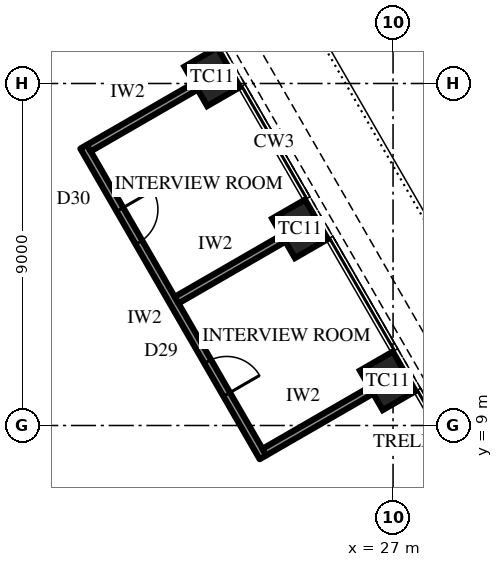
"""IFC4 building model, lengths in metres.
Left out: names, types, materials, properties, quantities, classifications, styles, units other than length and angle.
Written with IfcOpenShell. Run it as: python <this file> out.ifc"""

import sys

from ifc_helpers import new_model, si_unit, direction, frame, frame_2d, origin, origin_2d, place, context, subcontext, project, spatial, rectangle, extrude, element, fill, save


model = new_model("IFC4")
c1 = context("Model", 3, precision=1e-05, world=origin(), true_north=direction((0.0, 1.0)))
c2 = subcontext(c1, "Body", "Model", "MODEL_VIEW")
j1 = project(units=[si_unit("LENGTHUNIT", "METRE"), si_unit("PLANEANGLEUNIT", "RADIAN")], contexts=[c1])
p1 = place(None, origin())
s1 = spatial("IfcSite", under=j1, at=p1, CompositionType="ELEMENT")
p2 = place(p1, origin())
s2 = spatial("IfcBuilding", under=s1, at=p2, CompositionType="ELEMENT")
p3 = place(p2, frame((0.0, 0.0, 270.1)))
s3 = spatial("IfcBuildingStorey", under=s2, at=p3, CompositionType="ELEMENT", Elevation=270.1)
for number, where, z_axis, x_axis in (
    (1, (26.861, 10.175, 0.0), (0.0, 0.0, 1.0), (-0.5, 0.866, 0.0)),
    (2, (24.552, 14.175, 0.0), (0.0, 0.0, 1.0), (-0.5, 0.866, 0.0)),
    (3, (22.242, 18.175, 0.0), (0.0, 0.0, 1.0), (-0.5, 0.866, 0.0)),
):
    element("IfcColumn", number, at=place(p3, frame(where, z_axis=z_axis, x_axis=x_axis)), inside=s3, PredefinedType="COLUMN", context=c2, shape_type="SweptSolid", body=[
        extrude(rectangle(XDim=1.2, YDim=1.0, at=origin_2d()), origin(), (0.0, 0.0, 1.0), 4.2),
    ])
p4 = place(p3, frame((23.577, 8.163, 0.0), z_axis=(0.0, 0.0, 1.0), x_axis=(-0.499989672313, 0.866031366395, 0.0)))
e4 = element("IfcWall", 4, at=p4, inside=s3, PredefinedType="PARTITIONING", context=c2, shape_type="SweptSolid", body=[
    extrude(rectangle(XDim=9.438, YDim=0.2, at=frame_2d((4.719, 0.0))), origin(), (0.0, 0.0, 1.0), 4.0),
])
p5 = place(p4, frame((1.909, 0.0, 0.0)))
e5 = element("IfcOpeningElement", 5, at=p5, cuts=e4, PredefinedType="OPENING", context=c2, shape_type="SweptSolid", body=[
    extrude(rectangle(XDim=1.0, YDim=2.2, at=frame_2d((0.5, 1.1))), frame((0.0, 0.11, 0.0), z_axis=(0.0, -1.0, 0.0), x_axis=(1.0, 0.0, 0.0)), (0.0, 0.0, 1.0), 0.22),
])
p6 = place(p4, frame((6.528, 0.0, 0.0)))
e6 = element("IfcOpeningElement", 6, at=p6, cuts=e4, PredefinedType="OPENING", context=c2, shape_type="SweptSolid", body=[
    extrude(rectangle(XDim=1.0, YDim=2.2, at=frame_2d((0.5, 1.1))), frame((0.0, 0.11, 0.0), z_axis=(0.0, -1.0, 0.0), x_axis=(1.0, 0.0, 0.0)), (0.0, 0.0, 1.0), 0.22),
])
for number, where, z_axis, x_axis in (
    (7, (23.614, 8.3, 0.0), (0.0, 0.0, 1.0), (0.866, 0.5, 0.0)),
    (8, (21.304, 12.3, 0.0), (0.0, 0.0, 1.0), (0.866, 0.5, 0.0)),
    (9, (18.995, 16.3, 0.0), (0.0, 0.0, 1.0), (0.866, 0.5, 0.0)),
):
    element("IfcWall", number, at=place(p3, frame(where, z_axis=z_axis, x_axis=x_axis)), inside=s3, PredefinedType="PARTITIONING", context=c2, shape_type="SweptSolid", body=[
        extrude(rectangle(XDim=3.25, YDim=0.2, at=frame_2d((1.625, 0.0))), origin(), (0.0, 0.0, 1.0), 3.082),
    ])
p7 = place(p5, frame((1.0, 0.0, 0.0), z_axis=(0.0, 0.0, 1.0), x_axis=(-1.0, 0.0, 0.0)))
e10 = element("IfcDoor", 10, at=p7, inside=s3, OperationType="SINGLE_SWING_LEFT", PredefinedType="DOOR", context=c2, shape_type="SweptSolid", body=[
    extrude(rectangle(XDim=1.0, YDim=2.2, at=frame_2d((0.5, 1.1))), frame((0.0, 0.025, 0.0), z_axis=(0.0, -1.0, 0.0), x_axis=(1.0, 0.0, 0.0)), (0.0, 0.0, 1.0), 0.05),
])
fill(e5, e10)
p8 = place(p6, frame((1.0, 0.0, 0.0), z_axis=(0.0, 0.0, 1.0), x_axis=(-1.0, 0.0, 0.0)))
e11 = element("IfcDoor", 11, at=p8, inside=s3, OperationType="SINGLE_SWING_RIGHT", PredefinedType="DOOR", context=c2, shape_type="SweptSolid", body=[
    extrude(rectangle(XDim=1.0, YDim=2.2, at=frame_2d((0.5, 1.1))), frame((0.0, 0.025, 0.0), z_axis=(0.0, -1.0, 0.0), x_axis=(1.0, 0.0, 0.0)), (0.0, 0.0, 1.0), 0.05),
])
fill(e6, e11)
save(model, sys.argv[1])
